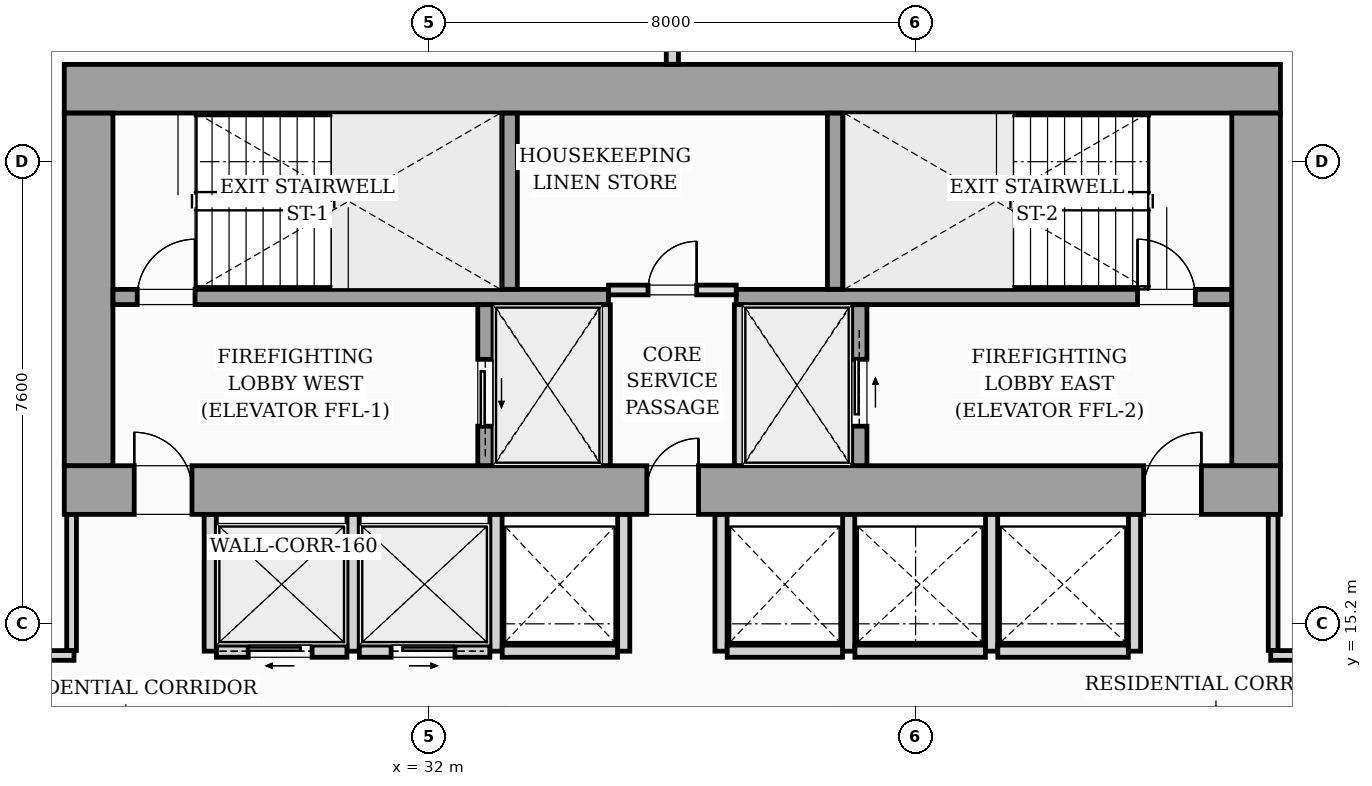
"""IFC4 building model, lengths in metres.
Left out: names, types, materials, properties, quantities, classifications, styles, units other than length and angle.
Written with IfcOpenShell. Run it as: python <this file> out.ifc"""

import sys

from ifc_helpers import new_model, si_unit, direction, frame, frame_2d, origin, origin_2d, place, context, subcontext, project, spatial, rectangle, i_section, extrude, source, transform, mapped, element, fill, save


model = new_model("IFC4")
c1 = context("Model", 3, precision=1e-05, world=origin(), true_north=direction((0.0, 1.0)))
c2 = subcontext(c1, "Body", "Model", "MODEL_VIEW")
j1 = project(units=[si_unit("LENGTHUNIT", "METRE"), si_unit("PLANEANGLEUNIT", "RADIAN")], contexts=[c1])
p1 = place(None, origin())
s1 = spatial("IfcSite", under=j1, at=p1, CompositionType="ELEMENT")
p2 = place(p1, origin())
s2 = spatial("IfcBuilding", under=s1, at=p2, CompositionType="ELEMENT")
p3 = place(p2, frame((0.0, 0.0, 64.6)))
s3 = spatial("IfcBuildingStorey", under=s2, at=p3, CompositionType="ELEMENT", Elevation=64.6)
m1 = source(origin(), c2, "Body", "SweptSolid", [
    extrude(i_section(OverallWidth=0.437, OverallDepth=0.514, WebThickness=0.061, FlangeThickness=0.097, FilletRadius=0.018, at=origin_2d()), origin(), (0.0, 0.0, 1.0), 3.196),
])
for number, where, z_axis, x_axis in (
    (1, (26.4, 17.4, 0.002), (0.0, 0.0, 1.0), (1.0, 0.0, 0.0)),
    (2, (33.12, 17.4, 0.002), (0.0, 0.0, 1.0), (1.0, 0.0, 0.0)),
    (3, (38.88, 17.4, 0.002), (0.0, 0.0, 1.0), (1.0, 0.0, 0.0)),
    (4, (45.6, 17.4, 0.002), (0.0, 0.0, 1.0), (1.0, 0.0, 0.0)),
    (5, (26.4, 24.0, 0.002), (0.0, 0.0, 1.0), (1.0, 0.0, 0.0)),
    (6, (33.12, 24.0, 0.002), (0.0, 0.0, 1.0), (1.0, 0.0, 0.0)),
    (7, (38.88, 24.0, 0.002), (0.0, 0.0, 1.0), (1.0, 0.0, 0.0)),
    (8, (45.6, 24.0, 0.002), (0.0, 0.0, 1.0), (1.0, 0.0, 0.0)),
):
    element("IfcColumn", number, at=place(p3, frame(where, z_axis=z_axis, x_axis=x_axis)), inside=s3, PredefinedType="PILASTER", context=c2, shape_type="MappedRepresentation", body=[
        mapped(m1, transform((0.0, 0.0, 0.0), scale=1.0)),
    ])
p4 = place(p3, frame((26.0, 17.4, 0.0), z_axis=(0.0, 0.0, 1.0), x_axis=(1.0, 0.0, 0.0)))
e9 = element("IfcWall", 9, at=p4, inside=s3, PredefinedType="SHEAR", context=c2, shape_type="SweptSolid", body=[
    extrude(rectangle(XDim=20.0, YDim=0.8, at=frame_2d((10.0, 0.0))), origin(), (0.0, 0.0, 1.0), 3.2),
])
p5 = place(p4, frame((1.15, 0.0, 0.0)))
e10 = element("IfcOpeningElement", 10, at=p5, cuts=e9, PredefinedType="OPENING", context=c2, shape_type="SweptSolid", body=[
    extrude(rectangle(XDim=0.95, YDim=2.06, at=frame_2d((0.475, 1.03))), frame((0.0, 0.41, 0.0), z_axis=(0.0, -1.0, 0.0), x_axis=(1.0, 0.0, 0.0)), (0.0, 0.0, 1.0), 0.82),
])
p6 = place(p4, frame((9.58, 0.0, 0.0)))
e11 = element("IfcOpeningElement", 11, at=p6, cuts=e9, PredefinedType="OPENING", context=c2, shape_type="SweptSolid", body=[
    extrude(rectangle(XDim=0.85, YDim=2.0, at=frame_2d((0.425, 1.0))), frame((0.0, 0.41, 0.0), z_axis=(0.0, -1.0, 0.0), x_axis=(1.0, 0.0, 0.0)), (0.0, 0.0, 1.0), 0.82),
])
p7 = place(p4, frame((17.75, 0.0, 0.0)))
e12 = element("IfcOpeningElement", 12, at=p7, cuts=e9, PredefinedType="OPENING", context=c2, shape_type="SweptSolid", body=[
    extrude(rectangle(XDim=0.95, YDim=2.06, at=frame_2d((0.475, 1.03))), frame((0.0, 0.41, 0.0), z_axis=(0.0, -1.0, 0.0), x_axis=(1.0, 0.0, 0.0)), (0.0, 0.0, 1.0), 0.82),
])
p8 = place(p3, frame((26.0, 24.0, 0.0), z_axis=(0.0, 0.0, 1.0), x_axis=(1.0, 0.0, 0.0)))
e13 = element("IfcWall", 13, at=p8, inside=s3, PredefinedType="SHEAR", context=c2, shape_type="SweptSolid", body=[
    extrude(rectangle(XDim=20.0, YDim=0.8, at=frame_2d((10.0, 0.0))), origin(), (0.0, 0.0, 1.0), 3.2),
])
for number, where, z_axis, x_axis in (
    (14, (26.4, 17.802, 0.0), (0.0, 0.0, 1.0), (0.0, 1.0, 0.0)),
    (15, (45.6, 17.802, 0.0), (0.0, 0.0, 1.0), (0.0, 1.0, 0.0)),
):
    element("IfcWall", number, at=place(p3, frame(where, z_axis=z_axis, x_axis=x_axis)), inside=s3, PredefinedType="SHEAR", context=c2, shape_type="SweptSolid", body=[
        extrude(rectangle(XDim=5.796, YDim=0.8, at=frame_2d((2.898, 0.0))), origin(), (0.0, 0.0, 1.0), 3.2),
    ])
p9 = place(p3, frame((26.802, 20.575, 0.0), z_axis=(0.0, 0.0, 1.0), x_axis=(1.0, 0.0, 0.0)))
e16 = element("IfcWall", 16, at=p9, inside=s3, PredefinedType="SOLIDWALL", context=c2, shape_type="SweptSolid", body=[
    extrude(rectangle(XDim=8.148, YDim=0.25, at=frame_2d((4.074, 0.0))), origin(), (0.0, 0.0, 1.0), 3.2),
])
p10 = place(p9, frame((0.398, 0.0, 0.0)))
e17 = element("IfcOpeningElement", 17, at=p10, cuts=e16, PredefinedType="OPENING", context=c2, shape_type="SweptSolid", body=[
    extrude(rectangle(XDim=0.95, YDim=2.06, at=frame_2d((0.475, 1.03))), frame((0.0, 0.135, 0.0), z_axis=(0.0, -1.0, 0.0), x_axis=(1.0, 0.0, 0.0)), (0.0, 0.0, 1.0), 0.27),
])
p11 = place(p3, frame((37.05, 20.575, 0.0), z_axis=(0.0, 0.0, 1.0), x_axis=(1.0, 0.0, 0.0)))
e18 = element("IfcWall", 18, at=p11, inside=s3, PredefinedType="SOLIDWALL", context=c2, shape_type="SweptSolid", body=[
    extrude(rectangle(XDim=8.148, YDim=0.25, at=frame_2d((4.074, 0.0))), origin(), (0.0, 0.0, 1.0), 3.2),
])
p12 = place(p11, frame((6.6, 0.0, 0.0)))
e19 = element("IfcOpeningElement", 19, at=p12, cuts=e18, PredefinedType="OPENING", context=c2, shape_type="SweptSolid", body=[
    extrude(rectangle(XDim=0.95, YDim=2.06, at=frame_2d((0.475, 1.03))), frame((0.0, 0.135, 0.0), z_axis=(0.0, -1.0, 0.0), x_axis=(1.0, 0.0, 0.0)), (0.0, 0.0, 1.0), 0.27),
])
for number, where, z_axis, x_axis in (
    (20, (33.325, 20.702, 0.0), (0.0, 0.0, 1.0), (0.0, 1.0, 0.0)),
    (21, (38.675, 20.702, 0.0), (0.0, 0.0, 1.0), (0.0, 1.0, 0.0)),
):
    element("IfcWall", number, at=place(p3, frame(where, z_axis=z_axis, x_axis=x_axis)), inside=s3, PredefinedType="SOLIDWALL", context=c2, shape_type="SweptSolid", body=[
        extrude(rectangle(XDim=2.896, YDim=0.25, at=frame_2d((1.448, 0.0))), origin(), (0.0, 0.0, 1.0), 3.2),
    ])
p13 = place(p3, frame((32.925, 17.802, 0.0), z_axis=(0.0, 0.0, 1.0), x_axis=(0.0, 1.0, 0.0)))
e22 = element("IfcWall", 22, at=p13, inside=s3, PredefinedType="SOLIDWALL", context=c2, shape_type="SweptSolid", body=[
    extrude(rectangle(XDim=2.646, YDim=0.25, at=frame_2d((1.323, 0.0))), origin(), (0.0, 0.0, 1.0), 3.2),
])
p14 = place(p13, frame((0.648, 0.0, 0.0)))
e23 = element("IfcOpeningElement", 23, at=p14, cuts=e22, PredefinedType="OPENING", context=c2, shape_type="SweptSolid", body=[
    extrude(rectangle(XDim=1.1, YDim=2.08, at=frame_2d((0.55, 1.04))), frame((0.0, 0.135, 0.0), z_axis=(0.0, -1.0, 0.0), x_axis=(1.0, 0.0, 0.0)), (0.0, 0.0, 1.0), 0.27),
])
for number, where, z_axis, x_axis in (
    (24, (34.9, 17.802, 0.0), (0.0, 0.0, 1.0), (0.0, 1.0, 0.0)),
    (25, (37.1, 17.802, 0.0), (0.0, 0.0, 1.0), (0.0, 1.0, 0.0)),
):
    element("IfcWall", number, at=place(p3, frame(where, z_axis=z_axis, x_axis=x_axis)), inside=s3, PredefinedType="PARTITIONING", context=c2, shape_type="SweptSolid", body=[
        extrude(rectangle(XDim=2.646, YDim=0.16, at=frame_2d((1.323, 0.0))), origin(), (0.0, 0.0, 1.0), 2.9),
    ])
p15 = place(p3, frame((39.075, 17.802, 0.0), z_axis=(0.0, 0.0, 1.0), x_axis=(0.0, 1.0, 0.0)))
e26 = element("IfcWall", 26, at=p15, inside=s3, PredefinedType="SOLIDWALL", context=c2, shape_type="SweptSolid", body=[
    extrude(rectangle(XDim=2.646, YDim=0.25, at=frame_2d((1.323, 0.0))), origin(), (0.0, 0.0, 1.0), 3.2),
])
p16 = place(p15, frame((0.648, 0.0, 0.0)))
e27 = element("IfcOpeningElement", 27, at=p16, cuts=e26, PredefinedType="OPENING", context=c2, shape_type="SweptSolid", body=[
    extrude(rectangle(XDim=1.1, YDim=2.08, at=frame_2d((0.55, 1.04))), frame((0.0, 0.135, 0.0), z_axis=(0.0, -1.0, 0.0), x_axis=(1.0, 0.0, 0.0)), (0.0, 0.0, 1.0), 0.27),
])
p17 = place(p3, frame((34.95, 20.69, 0.0), z_axis=(0.0, 0.0, 1.0), x_axis=(1.0, 0.0, 0.0)))
e28 = element("IfcWall", 28, at=p17, inside=s3, PredefinedType="PARTITIONING", context=c2, shape_type="SweptSolid", body=[
    extrude(rectangle(XDim=2.1, YDim=0.16, at=frame_2d((1.05, 0.0))), origin(), (0.0, 0.0, 1.0), 2.9),
])
p18 = place(p17, frame((0.65, 0.0, 0.0)))
e29 = element("IfcOpeningElement", 29, at=p18, cuts=e28, PredefinedType="OPENING", context=c2, shape_type="SweptSolid", body=[
    extrude(rectangle(XDim=0.8, YDim=2.05, at=frame_2d((0.4, 1.025))), frame((0.0, 0.09, 0.0), z_axis=(0.0, -1.0, 0.0), x_axis=(1.0, 0.0, 0.0)), (0.0, 0.0, 1.0), 0.18),
])
for number, where, z_axis, x_axis in (
    (30, (28.4, 14.75, 0.0), (0.0, 0.0, 1.0), (0.0, 1.0, 0.0)),
    (31, (30.75, 14.75, 0.0), (0.0, 0.0, 1.0), (0.0, 1.0, 0.0)),
    (32, (33.1, 14.75, 0.0), (0.0, 0.0, 1.0), (0.0, 1.0, 0.0)),
):
    element("IfcWall", number, at=place(p3, frame(where, z_axis=z_axis, x_axis=x_axis)), inside=s3, PredefinedType="PARTITIONING", context=c2, shape_type="SweptSolid", body=[
        extrude(rectangle(XDim=2.248, YDim=0.2, at=frame_2d((1.124, 0.0))), origin(), (0.0, 0.0, 1.0), 2.9),
    ])
p19 = place(p3, frame((28.502, 14.75, 0.0), z_axis=(0.0, 0.0, 1.0), x_axis=(1.0, 0.0, 0.0)))
e33 = element("IfcWall", 33, at=p19, inside=s3, PredefinedType="PARTITIONING", context=c2, shape_type="SweptSolid", body=[
    extrude(rectangle(XDim=2.146, YDim=0.2, at=frame_2d((1.073, 0.0))), origin(), (0.0, 0.0, 1.0), 2.9),
])
p20 = place(p19, frame((0.523, 0.0, 0.0)))
e34 = element("IfcOpeningElement", 34, at=p20, cuts=e33, PredefinedType="OPENING", context=c2, shape_type="SweptSolid", body=[
    extrude(rectangle(XDim=1.05, YDim=2.08, at=frame_2d((0.525, 1.04))), frame((0.0, 0.11, 0.0), z_axis=(0.0, -1.0, 0.0), x_axis=(1.0, 0.0, 0.0)), (0.0, 0.0, 1.0), 0.22),
])
p21 = place(p3, frame((30.852, 14.75, 0.0), z_axis=(0.0, 0.0, 1.0), x_axis=(1.0, 0.0, 0.0)))
e35 = element("IfcWall", 35, at=p21, inside=s3, PredefinedType="PARTITIONING", context=c2, shape_type="SweptSolid", body=[
    extrude(rectangle(XDim=2.146, YDim=0.2, at=frame_2d((1.073, 0.0))), origin(), (0.0, 0.0, 1.0), 2.9),
])
p22 = place(p21, frame((0.523, 0.0, 0.0)))
e36 = element("IfcOpeningElement", 36, at=p22, cuts=e35, PredefinedType="OPENING", context=c2, shape_type="SweptSolid", body=[
    extrude(rectangle(XDim=1.05, YDim=2.08, at=frame_2d((0.525, 1.04))), frame((0.0, 0.11, 0.0), z_axis=(0.0, -1.0, 0.0), x_axis=(1.0, 0.0, 0.0)), (0.0, 0.0, 1.0), 0.22),
])
p23 = place(p3, frame((35.2, 14.75, 0.0), z_axis=(0.0, 0.0, 1.0), x_axis=(0.0, 1.0, 0.0)))
e37 = element("IfcWall", 37, at=p23, inside=s3, PredefinedType="PARTITIONING", context=c2, shape_type="SweptSolid", body=[
    extrude(rectangle(XDim=2.248, YDim=0.2, at=frame_2d((1.124, 0.0))), origin(), (0.0, 0.0, 1.0), 2.9),
])
p24 = place(p3, frame((33.202, 14.75, 0.0), z_axis=(0.0, 0.0, 1.0), x_axis=(1.0, 0.0, 0.0)))
e38 = element("IfcWall", 38, at=p24, inside=s3, PredefinedType="PARTITIONING", context=c2, shape_type="SweptSolid", body=[
    extrude(rectangle(XDim=1.896, YDim=0.2, at=frame_2d((0.948, 0.0))), origin(), (0.0, 0.0, 1.0), 2.9),
])
for number, where, z_axis, x_axis in (
    (39, (36.8, 14.75, 0.0), (0.0, 0.0, 1.0), (0.0, 1.0, 0.0)),
    (40, (38.9, 14.75, 0.0), (0.0, 0.0, 1.0), (0.0, 1.0, 0.0)),
):
    element("IfcWall", number, at=place(p3, frame(where, z_axis=z_axis, x_axis=x_axis)), inside=s3, PredefinedType="PARTITIONING", context=c2, shape_type="SweptSolid", body=[
        extrude(rectangle(XDim=2.248, YDim=0.2, at=frame_2d((1.124, 0.0))), origin(), (0.0, 0.0, 1.0), 2.9),
    ])
p25 = place(p3, frame((36.902, 14.75, 0.0), z_axis=(0.0, 0.0, 1.0), x_axis=(1.0, 0.0, 0.0)))
e41 = element("IfcWall", 41, at=p25, inside=s3, PredefinedType="PARTITIONING", context=c2, shape_type="SweptSolid", body=[
    extrude(rectangle(XDim=1.896, YDim=0.2, at=frame_2d((0.948, 0.0))), origin(), (0.0, 0.0, 1.0), 2.9),
])
for number, where, z_axis, x_axis in (
    (42, (41.25, 14.75, 0.0), (0.0, 0.0, 1.0), (0.0, 1.0, 0.0)),
    (43, (43.6, 14.75, 0.0), (0.0, 0.0, 1.0), (0.0, 1.0, 0.0)),
):
    element("IfcWall", number, at=place(p3, frame(where, z_axis=z_axis, x_axis=x_axis)), inside=s3, PredefinedType="PARTITIONING", context=c2, shape_type="SweptSolid", body=[
        extrude(rectangle(XDim=2.248, YDim=0.2, at=frame_2d((1.124, 0.0))), origin(), (0.0, 0.0, 1.0), 2.9),
    ])
for number, where, z_axis, x_axis in (
    (44, (39.002, 14.75, 0.0), (0.0, 0.0, 1.0), (1.0, 0.0, 0.0)),
    (45, (41.352, 14.75, 0.0), (0.0, 0.0, 1.0), (1.0, 0.0, 0.0)),
):
    element("IfcWall", number, at=place(p3, frame(where, z_axis=z_axis, x_axis=x_axis)), inside=s3, PredefinedType="PARTITIONING", context=c2, shape_type="SweptSolid", body=[
        extrude(rectangle(XDim=2.146, YDim=0.2, at=frame_2d((1.073, 0.0))), origin(), (0.0, 0.0, 1.0), 2.9),
    ])
p26 = place(p3, frame((36.0, 24.402, 0.0), z_axis=(0.0, 0.0, 1.0), x_axis=(0.0, 1.0, 0.0)))
e46 = element("IfcWall", 46, at=p26, inside=s3, PredefinedType="PARTITIONING", context=c2, shape_type="SweptSolid", body=[
    extrude(rectangle(XDim=3.218, YDim=0.2, at=frame_2d((1.609, 0.0))), origin(), (0.0, 0.0, 1.0), 2.9),
])
p27 = place(p3, frame((17.232, 14.68, 0.0), z_axis=(0.0, 0.0, 1.0), x_axis=(1.0, 0.0, 0.0)))
e47 = element("IfcWall", 47, at=p27, inside=s3, PredefinedType="PARTITIONING", context=c2, shape_type="SweptSolid", body=[
    extrude(rectangle(XDim=8.928, YDim=0.16, at=frame_2d((4.464, 0.0))), origin(), (0.0, 0.0, 1.0), 2.9),
])
p28 = place(p27, frame((3.888, 0.0, 0.0)))
e48 = element("IfcOpeningElement", 48, at=p28, cuts=e47, PredefinedType="OPENING", context=c2, shape_type="SweptSolid", body=[
    extrude(rectangle(XDim=0.95, YDim=2.06, at=frame_2d((0.475, 1.03))), frame((0.0, 0.09, 0.0), z_axis=(0.0, -1.0, 0.0), x_axis=(1.0, 0.0, 0.0)), (0.0, 0.0, 1.0), 0.18),
])
p29 = place(p3, frame((26.12, 14.762, 0.0), z_axis=(0.0, 0.0, 1.0), x_axis=(0.0, 1.0, 0.0)))
e49 = element("IfcWall", 49, at=p29, inside=s3, PredefinedType="PARTITIONING", context=c2, shape_type="SweptSolid", body=[
    extrude(rectangle(XDim=2.236, YDim=0.16, at=frame_2d((1.118, 0.0))), origin(), (0.0, 0.0, 1.0), 2.9),
])
p30 = place(p3, frame((45.84, 14.68, 0.0), z_axis=(0.0, 0.0, 1.0), x_axis=(1.0, 0.0, 0.0)))
e50 = element("IfcWall", 50, at=p30, inside=s3, PredefinedType="PARTITIONING", context=c2, shape_type="SweptSolid", body=[
    extrude(rectangle(XDim=4.428, YDim=0.16, at=frame_2d((2.214, 0.0))), origin(), (0.0, 0.0, 1.0), 2.9),
])
p31 = place(p30, frame((1.84, 0.0, 0.0)))
e51 = element("IfcOpeningElement", 51, at=p31, cuts=e50, PredefinedType="OPENING", context=c2, shape_type="SweptSolid", body=[
    extrude(rectangle(XDim=0.95, YDim=2.06, at=frame_2d((0.475, 1.03))), frame((0.0, 0.09, 0.0), z_axis=(0.0, -1.0, 0.0), x_axis=(1.0, 0.0, 0.0)), (0.0, 0.0, 1.0), 0.18),
])
p32 = place(p3, frame((45.88, 14.762, 0.0), z_axis=(0.0, 0.0, 1.0), x_axis=(0.0, 1.0, 0.0)))
e52 = element("IfcWall", 52, at=p32, inside=s3, PredefinedType="PARTITIONING", context=c2, shape_type="SweptSolid", body=[
    extrude(rectangle(XDim=2.236, YDim=0.16, at=frame_2d((1.118, 0.0))), origin(), (0.0, 0.0, 1.0), 2.9),
])
m2 = source(origin(), c2, "Body", "SweptSolid", [
    extrude(rectangle(XDim=0.95, YDim=2.06, at=frame_2d((0.475, 1.03))), frame((0.0, 0.025, 0.0), z_axis=(0.0, -1.0, 0.0), x_axis=(1.0, 0.0, 0.0)), (0.0, 0.0, 1.0), 0.05),
])
p33 = place(p5, origin())
e53 = element("IfcDoor", 53, at=p33, inside=s3, OperationType="SINGLE_SWING_LEFT", PredefinedType="DOOR", context=c2, shape_type="MappedRepresentation", body=[
    mapped(m2, transform((0.0, 0.0, 0.0), scale=1.0)),
])
fill(e10, e53)
m3 = source(origin(), c2, "Body", "SweptSolid", [
    extrude(rectangle(XDim=0.85, YDim=2.0, at=frame_2d((0.425, 1.0))), frame((0.0, 0.025, 0.0), z_axis=(0.0, -1.0, 0.0), x_axis=(1.0, 0.0, 0.0)), (0.0, 0.0, 1.0), 0.05),
])
p34 = place(p6, origin())
e54 = element("IfcDoor", 54, at=p34, inside=s3, OperationType="SINGLE_SWING_RIGHT", PredefinedType="DOOR", context=c2, shape_type="MappedRepresentation", body=[
    mapped(m3, transform((0.0, 0.0, 0.0), scale=1.0)),
])
fill(e11, e54)
p35 = place(p7, origin())
e55 = element("IfcDoor", 55, at=p35, inside=s3, OperationType="SINGLE_SWING_RIGHT", PredefinedType="DOOR", context=c2, shape_type="MappedRepresentation", body=[
    mapped(m2, transform((0.0, 0.0, 0.0), scale=1.0)),
])
fill(e12, e55)
p36 = place(p10, origin())
e56 = element("IfcDoor", 56, at=p36, inside=s3, OperationType="SINGLE_SWING_RIGHT", PredefinedType="DOOR", context=c2, shape_type="MappedRepresentation", body=[
    mapped(m2, transform((0.0, 0.0, 0.0), scale=1.0)),
])
fill(e17, e56)
p37 = place(p12, origin())
e57 = element("IfcDoor", 57, at=p37, inside=s3, OperationType="SINGLE_SWING_LEFT", PredefinedType="DOOR", context=c2, shape_type="MappedRepresentation", body=[
    mapped(m2, transform((0.0, 0.0, 0.0), scale=1.0)),
])
fill(e19, e57)
m4 = source(origin(), c2, "Body", "SweptSolid", [
    extrude(rectangle(XDim=1.1, YDim=2.08, at=frame_2d((0.55, 1.04))), frame((0.0, 0.025, 0.0), z_axis=(0.0, -1.0, 0.0), x_axis=(1.0, 0.0, 0.0)), (0.0, 0.0, 1.0), 0.05),
])
p38 = place(p14, origin())
e58 = element("IfcDoor", 58, at=p38, inside=s3, OperationType="SLIDING_TO_LEFT", PredefinedType="DOOR", context=c2, shape_type="MappedRepresentation", body=[
    mapped(m4, transform((0.0, 0.0, 0.0), scale=1.0)),
])
fill(e23, e58)
p39 = place(p16, origin())
e59 = element("IfcDoor", 59, at=p39, inside=s3, OperationType="SLIDING_TO_RIGHT", PredefinedType="DOOR", context=c2, shape_type="MappedRepresentation", body=[
    mapped(m4, transform((0.0, 0.0, 0.0), scale=1.0)),
])
fill(e27, e59)
m5 = source(origin(), c2, "Body", "SweptSolid", [
    extrude(rectangle(XDim=0.8, YDim=2.05, at=frame_2d((0.4, 1.025))), frame((0.0, 0.025, 0.0), z_axis=(0.0, -1.0, 0.0), x_axis=(1.0, 0.0, 0.0)), (0.0, 0.0, 1.0), 0.05),
])
p40 = place(p18, origin())
e60 = element("IfcDoor", 60, at=p40, inside=s3, OperationType="SINGLE_SWING_RIGHT", PredefinedType="DOOR", context=c2, shape_type="MappedRepresentation", body=[
    mapped(m5, transform((0.0, 0.0, 0.0), scale=1.0)),
])
fill(e29, e60)
m6 = source(origin(), c2, "Body", "SweptSolid", [
    extrude(rectangle(XDim=1.05, YDim=2.08, at=frame_2d((0.525, 1.04))), frame((0.0, 0.025, 0.0), z_axis=(0.0, -1.0, 0.0), x_axis=(1.0, 0.0, 0.0)), (0.0, 0.0, 1.0), 0.05),
])
p41 = place(p20, origin())
e61 = element("IfcDoor", 61, at=p41, inside=s3, OperationType="SLIDING_TO_LEFT", PredefinedType="DOOR", context=c2, shape_type="MappedRepresentation", body=[
    mapped(m6, transform((0.0, 0.0, 0.0), scale=1.0)),
])
fill(e34, e61)
p42 = place(p22, origin())
e62 = element("IfcDoor", 62, at=p42, inside=s3, OperationType="SLIDING_TO_RIGHT", PredefinedType="DOOR", context=c2, shape_type="MappedRepresentation", body=[
    mapped(m6, transform((0.0, 0.0, 0.0), scale=1.0)),
])
fill(e36, e62)
save(model, sys.argv[1])
